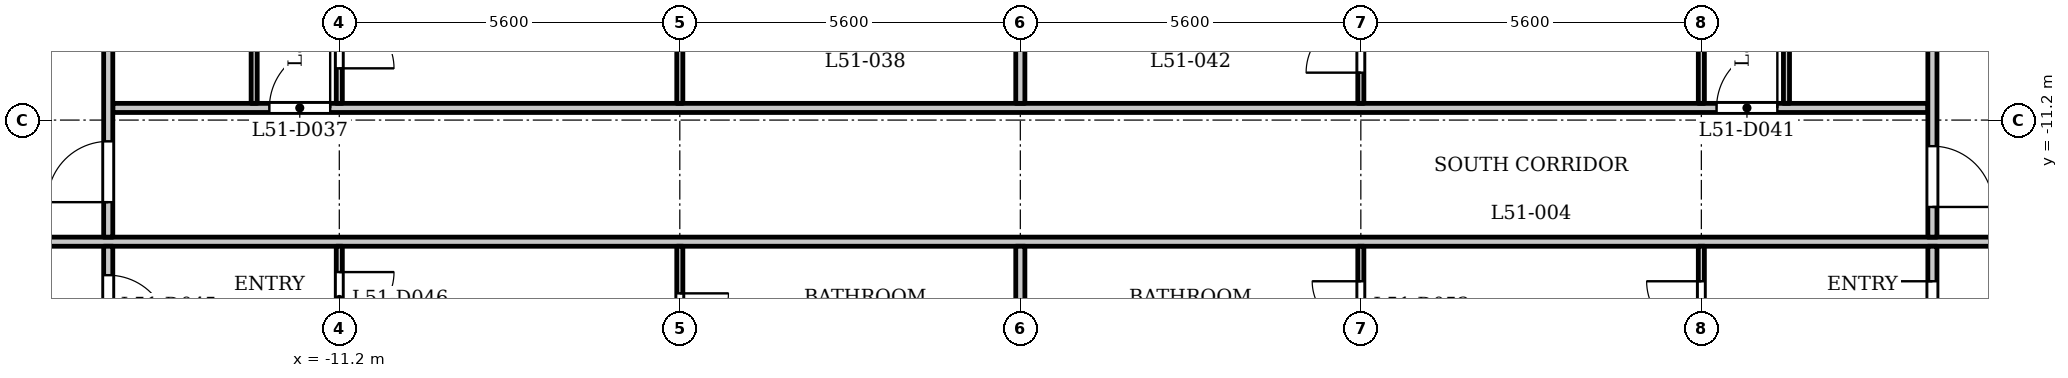
"""IFC4 building model, lengths in metres.
Left out: names, types, materials, properties, quantities, classifications, styles, units other than length and angle.
Written with IfcOpenShell. Run it as: python <this file> out.ifc"""

import sys

from ifc_helpers import new_model, si_unit, direction, frame, frame_2d, origin, place, context, subcontext, project, spatial, rectangle, extrude, element, fill, save


model = new_model("IFC4")
c1 = context("Model", 3, precision=1e-05, world=origin(), true_north=direction((0.0, 1.0)))
c2 = subcontext(c1, "Body", "Model", "MODEL_VIEW")
j1 = project(units=[si_unit("LENGTHUNIT", "METRE"), si_unit("PLANEANGLEUNIT", "RADIAN")], contexts=[c1])
p1 = place(None, origin())
s1 = spatial("IfcSite", under=j1, at=p1, CompositionType="ELEMENT")
p2 = place(p1, origin())
s2 = spatial("IfcBuilding", under=s1, at=p2, CompositionType="ELEMENT")
p3 = place(p2, frame((0.0, 0.0, 199.4)))
s3 = spatial("IfcBuildingStorey", under=s2, at=p3, CompositionType="ELEMENT", Elevation=199.4)
p4 = place(p3, frame((-17.4, -13.2, 0.0), z_axis=(0.0, 0.0, 1.0), x_axis=(1.0, 0.0, 0.0)))
e1 = element("IfcWall", 1, at=p4, inside=s3, PredefinedType="PARTITIONING", context=c2, shape_type="SweptSolid", body=[
    extrude(rectangle(XDim=34.8, YDim=0.15, at=frame_2d((17.4, 0.0))), origin(), (0.0, 0.0, 1.0), 3.2),
])
p5 = place(p4, frame((0.15, 0.0, 0.0)))
e2 = element("IfcOpeningElement", 2, at=p5, cuts=e1, PredefinedType="OPENING", context=c2, shape_type="SweptSolid", body=[
    extrude(rectangle(XDim=1.0, YDim=2.1, at=frame_2d((0.5, 1.05))), frame((0.0, 0.085, 0.0), z_axis=(0.0, -1.0, 0.0), x_axis=(1.0, 0.0, 0.0)), (0.0, 0.0, 1.0), 0.17),
])
p6 = place(p4, frame((33.55, 0.0, 0.0)))
e3 = element("IfcOpeningElement", 3, at=p6, cuts=e1, PredefinedType="OPENING", context=c2, shape_type="SweptSolid", body=[
    extrude(rectangle(XDim=1.0, YDim=2.1, at=frame_2d((0.5, 1.05))), frame((0.0, 0.085, 0.0), z_axis=(0.0, -1.0, 0.0), x_axis=(1.0, 0.0, 0.0)), (0.0, 0.0, 1.0), 0.17),
])
p7 = place(p3, frame((-14.925, -11.0, 0.0), z_axis=(0.0, 0.0, 1.0), x_axis=(1.0, 0.0, 0.0)))
e4 = element("IfcWall", 4, at=p7, inside=s3, PredefinedType="PARTITIONING", context=c2, shape_type="SweptSolid", body=[
    extrude(rectangle(XDim=29.85, YDim=0.15, at=frame_2d((14.925, 0.0))), origin(), (0.0, 0.0, 1.0), 3.2),
])
p8 = place(p7, frame((2.575, 0.0, 0.0)))
e5 = element("IfcOpeningElement", 5, at=p8, cuts=e4, PredefinedType="OPENING", context=c2, shape_type="SweptSolid", body=[
    extrude(rectangle(XDim=1.0, YDim=2.1, at=frame_2d((0.5, 1.05))), frame((0.0, 0.085, 0.0), z_axis=(0.0, -1.0, 0.0), x_axis=(1.0, 0.0, 0.0)), (0.0, 0.0, 1.0), 0.17),
])
p9 = place(p7, frame((26.375, 0.0, 0.0)))
e6 = element("IfcOpeningElement", 6, at=p9, cuts=e4, PredefinedType="OPENING", context=c2, shape_type="SweptSolid", body=[
    extrude(rectangle(XDim=1.0, YDim=2.1, at=frame_2d((0.5, 1.05))), frame((0.0, 0.085, 0.0), z_axis=(0.0, -1.0, 0.0), x_axis=(1.0, 0.0, 0.0)), (0.0, 0.0, 1.0), 0.17),
])
p10 = place(p3, frame((-15.0, -15.325, 0.0), z_axis=(0.0, 0.0, 1.0), x_axis=(0.0, 1.0, 0.0)))
e7 = element("IfcWall", 7, at=p10, inside=s3, PredefinedType="PARTITIONING", context=c2, shape_type="SweptSolid", body=[
    extrude(rectangle(XDim=2.05, YDim=0.15, at=frame_2d((1.025, 0.0))), origin(), (0.0, 0.0, 1.0), 3.2),
])
p11 = place(p10, frame((0.574, 0.0, 0.0)))
e8 = element("IfcOpeningElement", 8, at=p11, cuts=e7, PredefinedType="OPENING", context=c2, shape_type="SweptSolid", body=[
    extrude(rectangle(XDim=1.0, YDim=2.1, at=frame_2d((0.5, 1.05))), frame((0.0, 0.085, 0.0), z_axis=(0.0, -1.0, 0.0), x_axis=(1.0, 0.0, 0.0)), (0.0, 0.0, 1.0), 0.17),
])
p12 = place(p3, frame((-15.0, -13.125, 0.0), z_axis=(0.0, 0.0, 1.0), x_axis=(0.0, 1.0, 0.0)))
e9 = element("IfcWall", 9, at=p12, inside=s3, PredefinedType="PARTITIONING", context=c2, shape_type="SweptSolid", body=[
    extrude(rectangle(XDim=6.356, YDim=0.15, at=frame_2d((3.178, 0.0))), origin(), (0.0, 0.0, 1.0), 3.2),
])
p13 = place(p12, frame((0.575, 0.0, 0.0)))
e10 = element("IfcOpeningElement", 10, at=p13, cuts=e9, PredefinedType="OPENING", context=c2, shape_type="SweptSolid", body=[
    extrude(rectangle(XDim=1.0, YDim=2.1, at=frame_2d((0.5, 1.05))), frame((0.0, 0.085, 0.0), z_axis=(0.0, -1.0, 0.0), x_axis=(1.0, 0.0, 0.0)), (0.0, 0.0, 1.0), 0.17),
])
p14 = place(p3, frame((-12.6, -10.925, 0.0), z_axis=(0.0, 0.0, 1.0), x_axis=(0.0, 1.0, 0.0)))
e11 = element("IfcWall", 11, at=p14, inside=s3, PredefinedType="PARTITIONING", context=c2, shape_type="SweptSolid", body=[
    extrude(rectangle(XDim=3.605, YDim=0.1, at=frame_2d((1.802, 0.0))), origin(), (0.0, 0.0, 1.0), 3.2),
])
p15 = place(p14, frame((1.105, 0.0, 0.0)))
e12 = element("IfcOpeningElement", 12, at=p15, cuts=e11, PredefinedType="OPENING", context=c2, shape_type="SweptSolid", body=[
    extrude(rectangle(XDim=0.8, YDim=2.1, at=frame_2d((0.4, 1.05))), frame((0.0, 0.06, 0.0), z_axis=(0.0, -1.0, 0.0), x_axis=(1.0, 0.0, 0.0)), (0.0, 0.0, 1.0), 0.12),
])
p16 = place(p3, frame((-11.2, -16.45, 0.0), z_axis=(0.0, 0.0, 1.0), x_axis=(0.0, 1.0, 0.0)))
e13 = element("IfcWall", 13, at=p16, inside=s3, PredefinedType="PARTITIONING", context=c2, shape_type="SweptSolid", body=[
    extrude(rectangle(XDim=3.175, YDim=0.1, at=frame_2d((1.587, 0.0))), origin(), (0.0, 0.0, 1.0), 3.2),
])
p17 = place(p16, frame((1.85, 0.0, 0.0)))
e14 = element("IfcOpeningElement", 14, at=p17, cuts=e13, PredefinedType="OPENING", context=c2, shape_type="SweptSolid", body=[
    extrude(rectangle(XDim=0.9, YDim=2.1, at=frame_2d((0.45, 1.05))), frame((0.0, 0.06, 0.0), z_axis=(0.0, -1.0, 0.0), x_axis=(1.0, 0.0, 0.0)), (0.0, 0.0, 1.0), 0.12),
])
p18 = place(p3, frame((-11.2, -10.925, 0.0), z_axis=(0.0, 0.0, 1.0), x_axis=(0.0, 1.0, 0.0)))
e15 = element("IfcWall", 15, at=p18, inside=s3, PredefinedType="PARTITIONING", context=c2, shape_type="SweptSolid", body=[
    extrude(rectangle(XDim=3.605, YDim=0.1, at=frame_2d((1.802, 0.0))), origin(), (0.0, 0.0, 1.0), 3.2),
])
p19 = place(p18, frame((0.576, 0.0, 0.0)))
e16 = element("IfcOpeningElement", 16, at=p19, cuts=e15, PredefinedType="OPENING", context=c2, shape_type="SweptSolid", body=[
    extrude(rectangle(XDim=0.9, YDim=2.1, at=frame_2d((0.45, 1.05))), frame((0.0, 0.06, 0.0), z_axis=(0.0, -1.0, 0.0), x_axis=(1.0, 0.0, 0.0)), (0.0, 0.0, 1.0), 0.12),
])
p20 = place(p3, frame((-5.6, -16.45, 0.0), z_axis=(0.0, 0.0, 1.0), x_axis=(0.0, 1.0, 0.0)))
e17 = element("IfcWall", 17, at=p20, inside=s3, PredefinedType="PARTITIONING", context=c2, shape_type="SweptSolid", body=[
    extrude(rectangle(XDim=3.175, YDim=0.1, at=frame_2d((1.587, 0.0))), origin(), (0.0, 0.0, 1.0), 3.2),
])
p21 = place(p20, frame((1.6, 0.0, 0.0)))
e18 = element("IfcOpeningElement", 18, at=p21, cuts=e17, PredefinedType="OPENING", context=c2, shape_type="SweptSolid", body=[
    extrude(rectangle(XDim=0.8, YDim=2.1, at=frame_2d((0.4, 1.05))), frame((0.0, 0.06, 0.0), z_axis=(0.0, -1.0, 0.0), x_axis=(1.0, 0.0, 0.0)), (0.0, 0.0, 1.0), 0.12),
])
p22 = place(p3, frame((-5.6, -10.925, 0.0), z_axis=(0.0, 0.0, 1.0), x_axis=(0.0, 1.0, 0.0)))
e19 = element("IfcWall", 19, at=p22, inside=s3, PredefinedType="PARTITIONING", context=c2, shape_type="SweptSolid", body=[
    extrude(rectangle(XDim=3.605, YDim=0.1, at=frame_2d((1.802, 0.0))), origin(), (0.0, 0.0, 1.0), 3.2),
])
p23 = place(p22, frame((1.076, 0.0, 0.0)))
e20 = element("IfcOpeningElement", 20, at=p23, cuts=e19, PredefinedType="OPENING", context=c2, shape_type="SweptSolid", body=[
    extrude(rectangle(XDim=0.9, YDim=2.1, at=frame_2d((0.45, 1.05))), frame((0.0, 0.06, 0.0), z_axis=(0.0, -1.0, 0.0), x_axis=(1.0, 0.0, 0.0)), (0.0, 0.0, 1.0), 0.12),
])
p24 = place(p3, frame((0.0, -16.45, 0.0), z_axis=(0.0, 0.0, 1.0), x_axis=(0.0, 1.0, 0.0)))
e21 = element("IfcWall", 21, at=p24, inside=s3, PredefinedType="PARTITIONING", context=c2, shape_type="SweptSolid", body=[
    extrude(rectangle(XDim=3.175, YDim=0.15, at=frame_2d((1.587, 0.0))), origin(), (0.0, 0.0, 1.0), 3.2),
])
p25 = place(p3, frame((0.0, -10.925, 0.0), z_axis=(0.0, 0.0, 1.0), x_axis=(0.0, 1.0, 0.0)))
e22 = element("IfcWall", 22, at=p25, inside=s3, PredefinedType="PARTITIONING", context=c2, shape_type="SweptSolid", body=[
    extrude(rectangle(XDim=3.605, YDim=0.15, at=frame_2d((1.802, 0.0))), origin(), (0.0, 0.0, 1.0), 3.2),
])
p26 = place(p3, frame((5.6, -16.45, 0.0), z_axis=(0.0, 0.0, 1.0), x_axis=(0.0, 1.0, 0.0)))
e23 = element("IfcWall", 23, at=p26, inside=s3, PredefinedType="PARTITIONING", context=c2, shape_type="SweptSolid", body=[
    extrude(rectangle(XDim=3.175, YDim=0.1, at=frame_2d((1.587, 0.0))), origin(), (0.0, 0.0, 1.0), 3.2),
])
p27 = place(p26, frame((1.799, 0.0, 0.0)))
e24 = element("IfcOpeningElement", 24, at=p27, cuts=e23, PredefinedType="OPENING", context=c2, shape_type="SweptSolid", body=[
    extrude(rectangle(XDim=0.8, YDim=2.1, at=frame_2d((0.4, 1.05))), frame((0.0, 0.06, 0.0), z_axis=(0.0, -1.0, 0.0), x_axis=(1.0, 0.0, 0.0)), (0.0, 0.0, 1.0), 0.12),
])
p28 = place(p3, frame((5.6, -10.925, 0.0), z_axis=(0.0, 0.0, 1.0), x_axis=(0.0, 1.0, 0.0)))
e25 = element("IfcWall", 25, at=p28, inside=s3, PredefinedType="PARTITIONING", context=c2, shape_type="SweptSolid", body=[
    extrude(rectangle(XDim=3.605, YDim=0.1, at=frame_2d((1.802, 0.0))), origin(), (0.0, 0.0, 1.0), 3.2),
])
p29 = place(p28, frame((0.505, 0.0, 0.0)))
e26 = element("IfcOpeningElement", 26, at=p29, cuts=e25, PredefinedType="OPENING", context=c2, shape_type="SweptSolid", body=[
    extrude(rectangle(XDim=0.9, YDim=2.1, at=frame_2d((0.45, 1.05))), frame((0.0, 0.06, 0.0), z_axis=(0.0, -1.0, 0.0), x_axis=(1.0, 0.0, 0.0)), (0.0, 0.0, 1.0), 0.12),
])
p30 = place(p3, frame((11.2, -16.45, 0.0), z_axis=(0.0, 0.0, 1.0), x_axis=(0.0, 1.0, 0.0)))
e27 = element("IfcWall", 27, at=p30, inside=s3, PredefinedType="PARTITIONING", context=c2, shape_type="SweptSolid", body=[
    extrude(rectangle(XDim=3.175, YDim=0.1, at=frame_2d((1.587, 0.0))), origin(), (0.0, 0.0, 1.0), 3.2),
])
p31 = place(p30, frame((1.699, 0.0, 0.0)))
e28 = element("IfcOpeningElement", 28, at=p31, cuts=e27, PredefinedType="OPENING", context=c2, shape_type="SweptSolid", body=[
    extrude(rectangle(XDim=0.9, YDim=2.1, at=frame_2d((0.45, 1.05))), frame((0.0, 0.06, 0.0), z_axis=(0.0, -1.0, 0.0), x_axis=(1.0, 0.0, 0.0)), (0.0, 0.0, 1.0), 0.12),
])
p32 = place(p3, frame((11.2, -10.925, 0.0), z_axis=(0.0, 0.0, 1.0), x_axis=(0.0, 1.0, 0.0)))
e29 = element("IfcWall", 29, at=p32, inside=s3, PredefinedType="PARTITIONING", context=c2, shape_type="SweptSolid", body=[
    extrude(rectangle(XDim=3.605, YDim=0.1, at=frame_2d((1.802, 0.0))), origin(), (0.0, 0.0, 1.0), 3.2),
])
p33 = place(p32, frame((1.005, 0.0, 0.0)))
e30 = element("IfcOpeningElement", 30, at=p33, cuts=e29, PredefinedType="OPENING", context=c2, shape_type="SweptSolid", body=[
    extrude(rectangle(XDim=0.9, YDim=2.1, at=frame_2d((0.45, 1.05))), frame((0.0, 0.06, 0.0), z_axis=(0.0, -1.0, 0.0), x_axis=(1.0, 0.0, 0.0)), (0.0, 0.0, 1.0), 0.12),
])
p34 = place(p3, frame((12.6, -10.925, 0.0), z_axis=(0.0, 0.0, 1.0), x_axis=(0.0, 1.0, 0.0)))
e31 = element("IfcWall", 31, at=p34, inside=s3, PredefinedType="PARTITIONING", context=c2, shape_type="SweptSolid", body=[
    extrude(rectangle(XDim=3.605, YDim=0.1, at=frame_2d((1.802, 0.0))), origin(), (0.0, 0.0, 1.0), 3.2),
])
p35 = place(p34, frame((1.076, 0.0, 0.0)))
e32 = element("IfcOpeningElement", 32, at=p35, cuts=e31, PredefinedType="OPENING", context=c2, shape_type="SweptSolid", body=[
    extrude(rectangle(XDim=0.8, YDim=2.1, at=frame_2d((0.4, 1.05))), frame((0.0, 0.06, 0.0), z_axis=(0.0, -1.0, 0.0), x_axis=(1.0, 0.0, 0.0)), (0.0, 0.0, 1.0), 0.12),
])
p36 = place(p3, frame((15.0, -15.325, 0.0), z_axis=(0.0, 0.0, 1.0), x_axis=(0.0, 1.0, 0.0)))
e33 = element("IfcWall", 33, at=p36, inside=s3, PredefinedType="PARTITIONING", context=c2, shape_type="SweptSolid", body=[
    extrude(rectangle(XDim=2.05, YDim=0.15, at=frame_2d((1.025, 0.0))), origin(), (0.0, 0.0, 1.0), 3.2),
])
p37 = place(p36, frame((0.474, 0.0, 0.0)))
e34 = element("IfcOpeningElement", 34, at=p37, cuts=e33, PredefinedType="OPENING", context=c2, shape_type="SweptSolid", body=[
    extrude(rectangle(XDim=1.0, YDim=2.1, at=frame_2d((0.5, 1.05))), frame((0.0, 0.085, 0.0), z_axis=(0.0, -1.0, 0.0), x_axis=(1.0, 0.0, 0.0)), (0.0, 0.0, 1.0), 0.17),
])
p38 = place(p3, frame((15.0, -13.125, 0.0), z_axis=(0.0, 0.0, 1.0), x_axis=(0.0, 1.0, 0.0)))
e35 = element("IfcWall", 35, at=p38, inside=s3, PredefinedType="PARTITIONING", context=c2, shape_type="SweptSolid", body=[
    extrude(rectangle(XDim=6.356, YDim=0.15, at=frame_2d((3.178, 0.0))), origin(), (0.0, 0.0, 1.0), 3.2),
])
p39 = place(p38, frame((0.496, 0.0, 0.0)))
e36 = element("IfcOpeningElement", 36, at=p39, cuts=e35, PredefinedType="OPENING", context=c2, shape_type="SweptSolid", body=[
    extrude(rectangle(XDim=1.0, YDim=2.1, at=frame_2d((0.5, 1.05))), frame((0.0, 0.085, 0.0), z_axis=(0.0, -1.0, 0.0), x_axis=(1.0, 0.0, 0.0)), (0.0, 0.0, 1.0), 0.17),
])
p40 = place(p13, origin())
e37 = element("IfcDoor", 37, at=p40, inside=s3, OperationType="SINGLE_SWING_RIGHT", PredefinedType="DOOR", context=c2, shape_type="SweptSolid", body=[
    extrude(rectangle(XDim=1.0, YDim=2.1, at=frame_2d((0.5, 1.05))), frame((0.0, 0.025, 0.0), z_axis=(0.0, -1.0, 0.0), x_axis=(1.0, 0.0, 0.0)), (0.0, 0.0, 1.0), 0.05),
])
fill(e10, e37)
p41 = place(p39, origin())
e38 = element("IfcDoor", 38, at=p41, inside=s3, OperationType="SINGLE_SWING_LEFT", PredefinedType="DOOR", context=c2, shape_type="SweptSolid", body=[
    extrude(rectangle(XDim=1.0, YDim=2.1, at=frame_2d((0.5, 1.05))), frame((0.0, 0.025, 0.0), z_axis=(0.0, -1.0, 0.0), x_axis=(1.0, 0.0, 0.0)), (0.0, 0.0, 1.0), 0.05),
])
fill(e36, e38)
p42 = place(p8, origin())
e39 = element("IfcDoor", 39, at=p42, inside=s3, OperationType="SINGLE_SWING_LEFT", PredefinedType="DOOR", context=c2, shape_type="SweptSolid", body=[
    extrude(rectangle(XDim=1.0, YDim=2.1, at=frame_2d((0.5, 1.05))), frame((0.0, 0.025, 0.0), z_axis=(0.0, -1.0, 0.0), x_axis=(1.0, 0.0, 0.0)), (0.0, 0.0, 1.0), 0.05),
])
fill(e5, e39)
p43 = place(p19, origin())
e40 = element("IfcDoor", 40, at=p43, inside=s3, OperationType="SINGLE_SWING_LEFT", PredefinedType="DOOR", context=c2, shape_type="SweptSolid", body=[
    extrude(rectangle(XDim=0.9, YDim=2.1, at=frame_2d((0.45, 1.05))), frame((0.0, 0.025, 0.0), z_axis=(0.0, -1.0, 0.0), x_axis=(1.0, 0.0, 0.0)), (0.0, 0.0, 1.0), 0.05),
])
fill(e16, e40)
p44 = place(p9, origin())
e41 = element("IfcDoor", 41, at=p44, inside=s3, OperationType="SINGLE_SWING_LEFT", PredefinedType="DOOR", context=c2, shape_type="SweptSolid", body=[
    extrude(rectangle(XDim=1.0, YDim=2.1, at=frame_2d((0.5, 1.05))), frame((0.0, 0.025, 0.0), z_axis=(0.0, -1.0, 0.0), x_axis=(1.0, 0.0, 0.0)), (0.0, 0.0, 1.0), 0.05),
])
fill(e6, e41)
p45 = place(p29, origin())
e42 = element("IfcDoor", 42, at=p45, inside=s3, OperationType="SINGLE_SWING_RIGHT", PredefinedType="DOOR", context=c2, shape_type="SweptSolid", body=[
    extrude(rectangle(XDim=0.9, YDim=2.1, at=frame_2d((0.45, 1.05))), frame((0.0, 0.025, 0.0), z_axis=(0.0, -1.0, 0.0), x_axis=(1.0, 0.0, 0.0)), (0.0, 0.0, 1.0), 0.05),
])
fill(e26, e42)
p46 = place(p11, origin())
e43 = element("IfcDoor", 43, at=p46, inside=s3, OperationType="SINGLE_SWING_LEFT", PredefinedType="DOOR", context=c2, shape_type="SweptSolid", body=[
    extrude(rectangle(XDim=1.0, YDim=2.1, at=frame_2d((0.5, 1.05))), frame((0.0, 0.025, 0.0), z_axis=(0.0, -1.0, 0.0), x_axis=(1.0, 0.0, 0.0)), (0.0, 0.0, 1.0), 0.05),
])
fill(e8, e43)
p47 = place(p17, origin())
e44 = element("IfcDoor", 44, at=p47, inside=s3, OperationType="SINGLE_SWING_RIGHT", PredefinedType="DOOR", context=c2, shape_type="SweptSolid", body=[
    extrude(rectangle(XDim=0.9, YDim=2.1, at=frame_2d((0.45, 1.05))), frame((0.0, 0.025, 0.0), z_axis=(0.0, -1.0, 0.0), x_axis=(1.0, 0.0, 0.0)), (0.0, 0.0, 1.0), 0.05),
])
fill(e14, e44)
p48 = place(p21, origin())
e45 = element("IfcDoor", 45, at=p48, inside=s3, OperationType="SINGLE_SWING_RIGHT", PredefinedType="DOOR", context=c2, shape_type="SweptSolid", body=[
    extrude(rectangle(XDim=0.8, YDim=2.1, at=frame_2d((0.4, 1.05))), frame((0.0, 0.025, 0.0), z_axis=(0.0, -1.0, 0.0), x_axis=(1.0, 0.0, 0.0)), (0.0, 0.0, 1.0), 0.05),
])
fill(e18, e45)
p49 = place(p37, origin())
e46 = element("IfcDoor", 46, at=p49, inside=s3, OperationType="SINGLE_SWING_LEFT", PredefinedType="DOOR", context=c2, shape_type="SweptSolid", body=[
    extrude(rectangle(XDim=1.0, YDim=2.1, at=frame_2d((0.5, 1.05))), frame((0.0, 0.025, 0.0), z_axis=(0.0, -1.0, 0.0), x_axis=(1.0, 0.0, 0.0)), (0.0, 0.0, 1.0), 0.05),
])
fill(e34, e46)
p50 = place(p31, origin())
e47 = element("IfcDoor", 47, at=p50, inside=s3, OperationType="SINGLE_SWING_LEFT", PredefinedType="DOOR", context=c2, shape_type="SweptSolid", body=[
    extrude(rectangle(XDim=0.9, YDim=2.1, at=frame_2d((0.45, 1.05))), frame((0.0, 0.025, 0.0), z_axis=(0.0, -1.0, 0.0), x_axis=(1.0, 0.0, 0.0)), (0.0, 0.0, 1.0), 0.05),
])
fill(e28, e47)
p51 = place(p27, origin())
e48 = element("IfcDoor", 48, at=p51, inside=s3, OperationType="SINGLE_SWING_LEFT", PredefinedType="DOOR", context=c2, shape_type="SweptSolid", body=[
    extrude(rectangle(XDim=0.8, YDim=2.1, at=frame_2d((0.4, 1.05))), frame((0.0, 0.025, 0.0), z_axis=(0.0, -1.0, 0.0), x_axis=(1.0, 0.0, 0.0)), (0.0, 0.0, 1.0), 0.05),
])
fill(e24, e48)
save(model, sys.argv[1])
